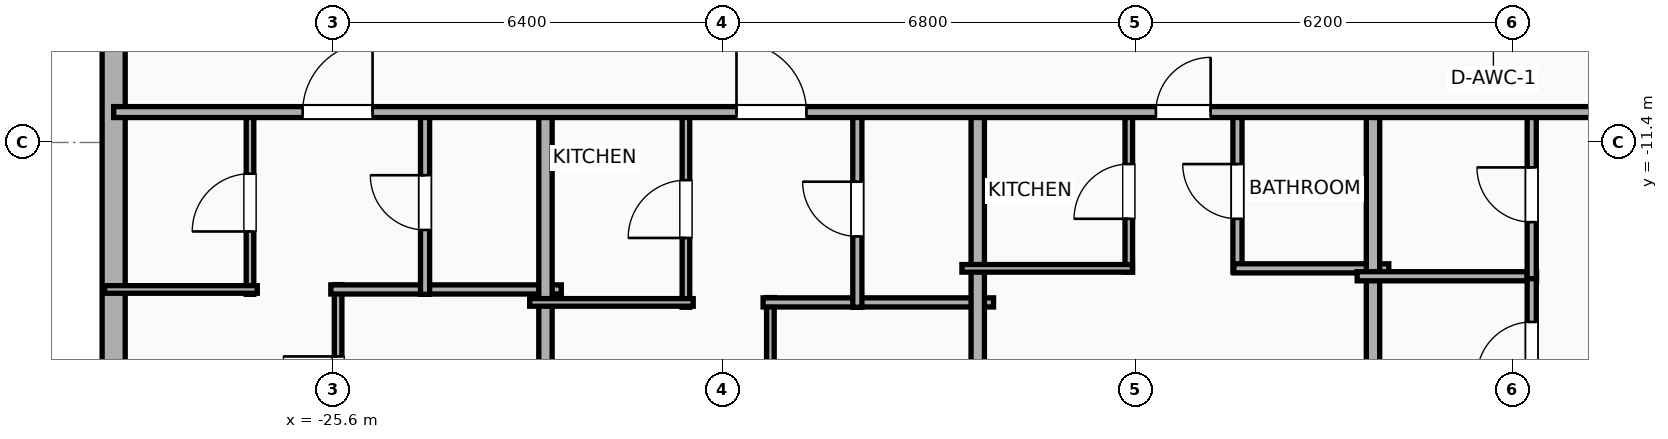
"""IFC4 building model, lengths in metres.
Left out: names, types, materials, properties, quantities, classifications, styles, units other than length and angle.
Written with IfcOpenShell. Run it as: python <this file> out.ifc"""

import sys

from ifc_helpers import new_model, si_unit, direction, frame, frame_2d, origin, place, context, subcontext, project, spatial, rectangle, extrude, element, fill, save


model = new_model("IFC4")
c1 = context("Model", 3, precision=1e-05, world=origin(), true_north=direction((0.0, 1.0)))
c2 = subcontext(c1, "Body", "Model", "MODEL_VIEW")
j1 = project(units=[si_unit("LENGTHUNIT", "METRE"), si_unit("PLANEANGLEUNIT", "RADIAN")], contexts=[c1])
p1 = place(None, origin())
s1 = spatial("IfcSite", under=j1, at=p1, CompositionType="ELEMENT")
p2 = place(p1, origin())
s2 = spatial("IfcBuilding", under=s1, at=p2, CompositionType="ELEMENT")
p3 = place(p2, frame((0.0, 0.0, 89.7)))
s3 = spatial("IfcBuildingStorey", under=s2, at=p3, CompositionType="ELEMENT", Elevation=89.7)
p4 = place(p3, frame((-29.21, -16.581, 0.0), z_axis=(0.0, 0.0, 1.0), x_axis=(0.0, 1.0, 0.0)))
e1 = element("IfcWall", 1, at=p4, inside=s3, PredefinedType="ELEMENTEDWALL", context=c2, shape_type="SweptSolid", body=[
    extrude(rectangle(XDim=34.363, YDim=0.38, at=frame_2d((17.181, 0.0))), origin(), (0.0, 0.0, 1.0), 2.54),
])
p5 = place(p4, frame((31.487, 0.0, 0.75)))
e2 = element("IfcOpeningElement", 2, at=p5, cuts=e1, PredefinedType="OPENING", context=c2, shape_type="SweptSolid", body=[
    extrude(rectangle(XDim=1.2, YDim=1.63, at=frame_2d((0.6, 0.815))), frame((0.0, 0.2, 0.0), z_axis=(0.0, -1.0, 0.0), x_axis=(1.0, 0.0, 0.0)), (0.0, 0.0, 1.0), 0.4),
])
p6 = place(p4, frame((20.726, 0.0, 0.75)))
e3 = element("IfcOpeningElement", 3, at=p6, cuts=e1, PredefinedType="OPENING", context=c2, shape_type="SweptSolid", body=[
    extrude(rectangle(XDim=1.2, YDim=1.63, at=frame_2d((0.6, 0.815))), frame((0.0, 0.2, 0.0), z_axis=(0.0, -1.0, 0.0), x_axis=(1.0, 0.0, 0.0)), (0.0, 0.0, 1.0), 0.4),
])
p7 = place(p4, frame((11.376, 0.0, 0.75)))
e4 = element("IfcOpeningElement", 4, at=p7, cuts=e1, PredefinedType="OPENING", context=c2, shape_type="SweptSolid", body=[
    extrude(rectangle(XDim=1.2, YDim=1.63, at=frame_2d((0.6, 0.815))), frame((0.0, 0.2, 0.0), z_axis=(0.0, -1.0, 0.0), x_axis=(1.0, 0.0, 0.0)), (0.0, 0.0, 1.0), 0.4),
])
p8 = place(p3, frame((-25.519, -20.535, 0.0), z_axis=(0.0, 0.0, 1.0), x_axis=(0.0, 1.0, 0.0)))
e5 = element("IfcWall", 5, at=p8, inside=s3, PredefinedType="PARTITIONING", context=c2, shape_type="SweptSolid", body=[
    extrude(rectangle(XDim=6.798, YDim=0.125, at=frame_2d((3.399, 0.0))), origin(), (0.0, 0.0, 1.0), 3.65),
])
p9 = place(p8, frame((4.717, 0.0, 0.0)))
e6 = element("IfcOpeningElement", 6, at=p9, cuts=e5, PredefinedType="OPENING", context=c2, shape_type="SweptSolid", body=[
    extrude(rectangle(XDim=0.9, YDim=2.05, at=frame_2d((0.45, 1.025))), frame((0.0, 0.073, 0.0), z_axis=(0.0, -1.0, 0.0), x_axis=(1.0, 0.0, 0.0)), (0.0, 0.0, 1.0), 0.145),
])
p10 = place(p3, frame((-25.639, -13.817, 0.0), z_axis=(0.0, 0.0, 1.0), x_axis=(1.0, 0.0, 0.0)))
e7 = element("IfcWall", 7, at=p10, inside=s3, PredefinedType="PLUMBINGWALL", context=c2, shape_type="SweptSolid", body=[
    extrude(rectangle(XDim=3.79, YDim=0.15, at=frame_2d((1.895, 0.0))), origin(), (0.0, 0.0, 1.0), 3.65),
])
p11 = place(p3, frame((-26.968, -13.897, 0.0), z_axis=(0.0, 0.0, 1.0), x_axis=(0.0, 1.0, 0.0)))
e8 = element("IfcWall", 8, at=p11, inside=s3, PredefinedType="PARTITIONING", context=c2, shape_type="SweptSolid", body=[
    extrude(rectangle(XDim=3.017, YDim=0.125, at=frame_2d((1.509, 0.0))), origin(), (0.0, 0.0, 1.0), 3.65),
])
p12 = place(p11, frame((1.033, 0.0, 0.0)))
e9 = element("IfcOpeningElement", 9, at=p12, cuts=e8, PredefinedType="OPENING", context=c2, shape_type="SweptSolid", body=[
    extrude(rectangle(XDim=0.95, YDim=2.05, at=frame_2d((0.475, 1.025))), frame((0.0, 0.073, 0.0), z_axis=(0.0, -1.0, 0.0), x_axis=(1.0, 0.0, 0.0)), (0.0, 0.0, 1.0), 0.145),
])
p13 = place(p3, frame((-29.36, -13.817, 0.0), z_axis=(0.0, 0.0, 1.0), x_axis=(1.0, 0.0, 0.0)))
e10 = element("IfcWall", 10, at=p13, inside=s3, PredefinedType="PARTITIONING", context=c2, shape_type="SweptSolid", body=[
    extrude(rectangle(XDim=2.512, YDim=0.125, at=frame_2d((1.256, 0.0))), origin(), (0.0, 0.0, 1.0), 3.65),
])
p14 = place(p3, frame((-24.089, -13.897, 0.0), z_axis=(0.0, 0.0, 1.0), x_axis=(0.0, 1.0, 0.0)))
e11 = element("IfcWall", 11, at=p14, inside=s3, PredefinedType="PLUMBINGWALL", context=c2, shape_type="SweptSolid", body=[
    extrude(rectangle(XDim=3.017, YDim=0.15, at=frame_2d((1.509, 0.0))), origin(), (0.0, 0.0, 1.0), 3.65),
])
p15 = place(p14, frame((1.059, 0.0, 0.0)))
e12 = element("IfcOpeningElement", 12, at=p15, cuts=e11, PredefinedType="OPENING", context=c2, shape_type="SweptSolid", body=[
    extrude(rectangle(XDim=0.9, YDim=2.05, at=frame_2d((0.45, 1.025))), frame((0.0, 0.085, 0.0), z_axis=(0.0, -1.0, 0.0), x_axis=(1.0, 0.0, 0.0)), (0.0, 0.0, 1.0), 0.17),
])
p16 = place(p3, frame((-22.109, -20.41, 0.0), z_axis=(0.0, 0.0, 1.0), x_axis=(0.0, 1.0, 0.0)))
e13 = element("IfcWall", 13, at=p16, inside=s3, PredefinedType="PARTITIONING", context=c2, shape_type="SweptSolid", body=[
    extrude(rectangle(XDim=9.59, YDim=0.22, at=frame_2d((4.795, 0.0))), origin(), (0.0, 0.0, 1.0), 3.65),
])
p17 = place(p3, frame((-18.41, -20.56, 0.0), z_axis=(0.0, 0.0, 1.0), x_axis=(0.0, 1.0, 0.0)))
e14 = element("IfcWall", 14, at=p17, inside=s3, PredefinedType="PARTITIONING", context=c2, shape_type="SweptSolid", body=[
    extrude(rectangle(XDim=6.61, YDim=0.125, at=frame_2d((3.305, 0.0))), origin(), (0.0, 0.0, 1.0), 3.65),
])
p18 = place(p17, frame((4.573, 0.0, 0.0)))
e15 = element("IfcOpeningElement", 15, at=p18, cuts=e14, PredefinedType="OPENING", context=c2, shape_type="SweptSolid", body=[
    extrude(rectangle(XDim=0.9, YDim=2.05, at=frame_2d((0.45, 1.025))), frame((0.0, 0.073, 0.0), z_axis=(0.0, -1.0, 0.0), x_axis=(1.0, 0.0, 0.0)), (0.0, 0.0, 1.0), 0.145),
])
p19 = place(p3, frame((-18.53, -14.03, 0.0), z_axis=(0.0, 0.0, 1.0), x_axis=(1.0, 0.0, 0.0)))
e16 = element("IfcWall", 16, at=p19, inside=s3, PredefinedType="PLUMBINGWALL", context=c2, shape_type="SweptSolid", body=[
    extrude(rectangle(XDim=3.79, YDim=0.15, at=frame_2d((1.895, 0.0))), origin(), (0.0, 0.0, 1.0), 3.65),
])
p20 = place(p3, frame((-19.799, -14.11, 0.0), z_axis=(0.0, 0.0, 1.0), x_axis=(0.0, 1.0, 0.0)))
e17 = element("IfcWall", 17, at=p20, inside=s3, PredefinedType="PARTITIONING", context=c2, shape_type="SweptSolid", body=[
    extrude(rectangle(XDim=3.23, YDim=0.125, at=frame_2d((1.615, 0.0))), origin(), (0.0, 0.0, 1.0), 3.65),
])
p21 = place(p20, frame((1.14, 0.0, 0.0)))
e18 = element("IfcOpeningElement", 18, at=p21, cuts=e17, PredefinedType="OPENING", context=c2, shape_type="SweptSolid", body=[
    extrude(rectangle(XDim=0.95, YDim=2.05, at=frame_2d((0.475, 1.025))), frame((0.0, 0.073, 0.0), z_axis=(0.0, -1.0, 0.0), x_axis=(1.0, 0.0, 0.0)), (0.0, 0.0, 1.0), 0.145),
])
p22 = place(p3, frame((-22.369, -14.03, 0.0), z_axis=(0.0, 0.0, 1.0), x_axis=(1.0, 0.0, 0.0)))
e19 = element("IfcWall", 19, at=p22, inside=s3, PredefinedType="PARTITIONING", context=c2, shape_type="SweptSolid", body=[
    extrude(rectangle(XDim=2.69, YDim=0.125, at=frame_2d((1.345, 0.0))), origin(), (0.0, 0.0, 1.0), 3.65),
])
p23 = place(p3, frame((-16.98, -14.11, 0.0), z_axis=(0.0, 0.0, 1.0), x_axis=(0.0, 1.0, 0.0)))
e20 = element("IfcWall", 20, at=p23, inside=s3, PredefinedType="PLUMBINGWALL", context=c2, shape_type="SweptSolid", body=[
    extrude(rectangle(XDim=3.23, YDim=0.15, at=frame_2d((1.615, 0.0))), origin(), (0.0, 0.0, 1.0), 3.65),
])
p24 = place(p23, frame((1.165, 0.0, 0.0)))
e21 = element("IfcOpeningElement", 21, at=p24, cuts=e20, PredefinedType="OPENING", context=c2, shape_type="SweptSolid", body=[
    extrude(rectangle(XDim=0.9, YDim=2.05, at=frame_2d((0.45, 1.025))), frame((0.0, 0.085, 0.0), z_axis=(0.0, -1.0, 0.0), x_axis=(1.0, 0.0, 0.0)), (0.0, 0.0, 1.0), 0.17),
])
p25 = place(p3, frame((-15.0, -20.41, 0.0), z_axis=(0.0, 0.0, 1.0), x_axis=(0.0, 1.0, 0.0)))
e22 = element("IfcWall", 22, at=p25, inside=s3, PredefinedType="PARTITIONING", context=c2, shape_type="SweptSolid", body=[
    extrude(rectangle(XDim=9.59, YDim=0.22, at=frame_2d((4.795, 0.0))), origin(), (0.0, 0.0, 1.0), 2.54),
])
p26 = place(p3, frame((-12.516, -13.53, 0.0), z_axis=(0.0, 0.0, 1.0), x_axis=(0.0, 1.0, 0.0)))
e23 = element("IfcWall", 23, at=p26, inside=s3, PredefinedType="PARTITIONING", context=c2, shape_type="SweptSolid", body=[
    extrude(rectangle(XDim=2.65, YDim=0.125, at=frame_2d((1.325, 0.0))), origin(), (0.0, 0.0, 1.0), 3.65),
])
p27 = place(p26, frame((0.875, 0.0, 0.0)))
e24 = element("IfcOpeningElement", 24, at=p27, cuts=e23, PredefinedType="OPENING", context=c2, shape_type="SweptSolid", body=[
    extrude(rectangle(XDim=0.9, YDim=2.05, at=frame_2d((0.45, 1.025))), frame((0.0, 0.073, 0.0), z_axis=(0.0, -1.0, 0.0), x_axis=(1.0, 0.0, 0.0)), (0.0, 0.0, 1.0), 0.145),
])
p28 = place(p3, frame((-10.729, -13.53, 0.0), z_axis=(0.0, 0.0, 1.0), x_axis=(0.0, 1.0, 0.0)))
e25 = element("IfcWall", 25, at=p28, inside=s3, PredefinedType="PLUMBINGWALL", context=c2, shape_type="SweptSolid", body=[
    extrude(rectangle(XDim=2.65, YDim=0.15, at=frame_2d((1.325, 0.0))), origin(), (0.0, 0.0, 1.0), 3.65),
])
p29 = place(p28, frame((0.875, 0.0, 0.0)))
e26 = element("IfcOpeningElement", 26, at=p29, cuts=e25, PredefinedType="OPENING", context=c2, shape_type="SweptSolid", body=[
    extrude(rectangle(XDim=0.9, YDim=2.05, at=frame_2d((0.45, 1.025))), frame((0.0, 0.085, 0.0), z_axis=(0.0, -1.0, 0.0), x_axis=(1.0, 0.0, 0.0)), (0.0, 0.0, 1.0), 0.17),
])
p30 = place(p3, frame((-15.26, -13.47, 0.0), z_axis=(0.0, 0.0, 1.0), x_axis=(1.0, 0.0, 0.0)))
e27 = element("IfcWall", 27, at=p30, inside=s3, PredefinedType="PARTITIONING", context=c2, shape_type="SweptSolid", body=[
    extrude(rectangle(XDim=2.804, YDim=0.125, at=frame_2d((1.402, 0.0))), origin(), (0.0, 0.0, 1.0), 3.65),
])
p31 = place(p3, frame((-10.789, -13.47, 0.0), z_axis=(0.0, 0.0, 1.0), x_axis=(1.0, 0.0, 0.0)))
e28 = element("IfcWall", 28, at=p31, inside=s3, PredefinedType="PLUMBINGWALL", context=c2, shape_type="SweptSolid", body=[
    extrude(rectangle(XDim=2.549, YDim=0.15, at=frame_2d((1.274, 0.0))), origin(), (0.0, 0.0, 1.0), 3.65),
])
p32 = place(p3, frame((-8.5, -20.41, 0.0), z_axis=(0.0, 0.0, 1.0), x_axis=(0.0, 1.0, 0.0)))
e29 = element("IfcWall", 29, at=p32, inside=s3, PredefinedType="PARTITIONING", context=c2, shape_type="SweptSolid", body=[
    extrude(rectangle(XDim=9.59, YDim=0.22, at=frame_2d((4.795, 0.0))), origin(), (0.0, 0.0, 1.0), 3.65),
])
p33 = place(p3, frame((-8.76, -13.6, 0.0), z_axis=(0.0, 0.0, 1.0), x_axis=(1.0, 0.0, 0.0)))
e30 = element("IfcWall", 30, at=p33, inside=s3, PredefinedType="PLUMBINGWALL", context=c2, shape_type="SweptSolid", body=[
    extrude(rectangle(XDim=2.95, YDim=0.15, at=frame_2d((1.475, 0.0))), origin(), (0.0, 0.0, 1.0), 3.65),
])
p34 = place(p3, frame((-5.89, -20.458, 0.0), z_axis=(0.0, 0.0, 1.0), x_axis=(0.0, 1.0, 0.0)))
e31 = element("IfcWall", 31, at=p34, inside=s3, PredefinedType="PLUMBINGWALL", context=c2, shape_type="SweptSolid", body=[
    extrude(rectangle(XDim=6.897, YDim=0.15, at=frame_2d((3.449, 0.0))), origin(), (0.0, 0.0, 1.0), 3.65),
])
p35 = place(p34, frame((5.206, 0.0, 0.0)))
e32 = element("IfcOpeningElement", 32, at=p35, cuts=e31, PredefinedType="OPENING", context=c2, shape_type="SweptSolid", body=[
    extrude(rectangle(XDim=0.9, YDim=2.05, at=frame_2d((0.45, 1.025))), frame((0.0, 0.085, 0.0), z_axis=(0.0, -1.0, 0.0), x_axis=(1.0, 0.0, 0.0)), (0.0, 0.0, 1.0), 0.17),
])
p36 = place(p3, frame((-5.89, -13.64, 0.0), z_axis=(0.0, 0.0, 1.0), x_axis=(0.0, 1.0, 0.0)))
e33 = element("IfcWall", 33, at=p36, inside=s3, PredefinedType="PLUMBINGWALL", context=c2, shape_type="SweptSolid", body=[
    extrude(rectangle(XDim=2.76, YDim=0.15, at=frame_2d((1.38, 0.0))), origin(), (0.0, 0.0, 1.0), 3.65),
])
p37 = place(p36, frame((0.93, 0.0, 0.0)))
e34 = element("IfcOpeningElement", 34, at=p37, cuts=e33, PredefinedType="OPENING", context=c2, shape_type="SweptSolid", body=[
    extrude(rectangle(XDim=0.9, YDim=2.05, at=frame_2d((0.45, 1.025))), frame((0.0, 0.085, 0.0), z_axis=(0.0, -1.0, 0.0), x_axis=(1.0, 0.0, 0.0)), (0.0, 0.0, 1.0), 0.17),
])
p38 = place(p3, frame((-29.21, -10.9, 0.0), z_axis=(0.0, 0.0, 1.0), x_axis=(1.0, 0.0, 0.0)))
e35 = element("IfcWall", 35, at=p38, inside=s3, PredefinedType="PARTITIONING", context=c2, shape_type="SweptSolid", body=[
    extrude(rectangle(XDim=62.42, YDim=0.18, at=frame_2d((31.21, 0.0))), origin(), (0.0, 0.0, 1.0), 3.65),
])
p39 = place(p38, frame((3.108, 0.0, 0.0)))
e36 = element("IfcOpeningElement", 36, at=p39, cuts=e35, PredefinedType="OPENING", context=c2, shape_type="SweptSolid", body=[
    extrude(rectangle(XDim=1.15, YDim=2.05, at=frame_2d((0.575, 1.025))), frame((0.0, 0.1, 0.0), z_axis=(0.0, -1.0, 0.0), x_axis=(1.0, 0.0, 0.0)), (0.0, 0.0, 1.0), 0.2),
])
p40 = place(p38, frame((10.242, 0.0, 0.0)))
e37 = element("IfcOpeningElement", 37, at=p40, cuts=e35, PredefinedType="OPENING", context=c2, shape_type="SweptSolid", body=[
    extrude(rectangle(XDim=1.15, YDim=2.05, at=frame_2d((0.575, 1.025))), frame((0.0, 0.1, 0.0), z_axis=(0.0, -1.0, 0.0), x_axis=(1.0, 0.0, 0.0)), (0.0, 0.0, 1.0), 0.2),
])
p41 = place(p38, frame((17.14, 0.0, 0.0)))
e38 = element("IfcOpeningElement", 38, at=p41, cuts=e35, PredefinedType="OPENING", context=c2, shape_type="SweptSolid", body=[
    extrude(rectangle(XDim=0.9, YDim=2.05, at=frame_2d((0.45, 1.025))), frame((0.0, 0.1, 0.0), z_axis=(0.0, -1.0, 0.0), x_axis=(1.0, 0.0, 0.0)), (0.0, 0.0, 1.0), 0.2),
])
p42 = place(p38, frame((24.661, 0.0, 0.0)))
e39 = element("IfcOpeningElement", 39, at=p42, cuts=e35, PredefinedType="OPENING", context=c2, shape_type="SweptSolid", body=[
    extrude(rectangle(XDim=1.15, YDim=2.05, at=frame_2d((0.575, 1.025))), frame((0.0, 0.1, 0.0), z_axis=(0.0, -1.0, 0.0), x_axis=(1.0, 0.0, 0.0)), (0.0, 0.0, 1.0), 0.2),
])
p43 = place(p38, frame((28.644, 0.0, 0.0)))
e40 = element("IfcOpeningElement", 40, at=p43, cuts=e35, PredefinedType="OPENING", context=c2, shape_type="SweptSolid", body=[
    extrude(rectangle(XDim=1.15, YDim=2.05, at=frame_2d((0.575, 1.025))), frame((0.0, 0.1, 0.0), z_axis=(0.0, -1.0, 0.0), x_axis=(1.0, 0.0, 0.0)), (0.0, 0.0, 1.0), 0.2),
])
p44 = place(p38, frame((36.64, 0.0, 0.0)))
e41 = element("IfcOpeningElement", 41, at=p44, cuts=e35, PredefinedType="OPENING", context=c2, shape_type="SweptSolid", body=[
    extrude(rectangle(XDim=0.9, YDim=2.05, at=frame_2d((0.45, 1.025))), frame((0.0, 0.1, 0.0), z_axis=(0.0, -1.0, 0.0), x_axis=(1.0, 0.0, 0.0)), (0.0, 0.0, 1.0), 0.2),
])
p45 = place(p38, frame((41.44, 0.0, 0.0)))
e42 = element("IfcOpeningElement", 42, at=p45, cuts=e35, PredefinedType="OPENING", context=c2, shape_type="SweptSolid", body=[
    extrude(rectangle(XDim=1.15, YDim=2.05, at=frame_2d((0.575, 1.025))), frame((0.0, 0.1, 0.0), z_axis=(0.0, -1.0, 0.0), x_axis=(1.0, 0.0, 0.0)), (0.0, 0.0, 1.0), 0.2),
])
p46 = place(p38, frame((47.538, 0.0, 0.0)))
e43 = element("IfcOpeningElement", 43, at=p46, cuts=e35, PredefinedType="OPENING", context=c2, shape_type="SweptSolid", body=[
    extrude(rectangle(XDim=1.15, YDim=2.05, at=frame_2d((0.575, 1.025))), frame((0.0, 0.1, 0.0), z_axis=(0.0, -1.0, 0.0), x_axis=(1.0, 0.0, 0.0)), (0.0, 0.0, 1.0), 0.2),
])
p47 = place(p38, frame((57.157, 0.0, 0.0)))
e44 = element("IfcOpeningElement", 44, at=p47, cuts=e35, PredefinedType="OPENING", context=c2, shape_type="SweptSolid", body=[
    extrude(rectangle(XDim=1.15, YDim=2.05, at=frame_2d((0.575, 1.025))), frame((0.0, 0.1, 0.0), z_axis=(0.0, -1.0, 0.0), x_axis=(1.0, 0.0, 0.0)), (0.0, 0.0, 1.0), 0.2),
])
p48 = place(p9, origin())
e45 = element("IfcDoor", 45, at=p48, inside=s3, OperationType="SINGLE_SWING_RIGHT", PredefinedType="DOOR", context=c2, shape_type="SweptSolid", body=[
    extrude(rectangle(XDim=0.9, YDim=2.05, at=frame_2d((0.45, 1.025))), frame((0.0, 0.025, 0.0), z_axis=(0.0, -1.0, 0.0), x_axis=(1.0, 0.0, 0.0)), (0.0, 0.0, 1.0), 0.05),
])
fill(e6, e45)
p49 = place(p12, origin())
e46 = element("IfcDoor", 46, at=p49, inside=s3, OperationType="SINGLE_SWING_LEFT", PredefinedType="DOOR", context=c2, shape_type="SweptSolid", body=[
    extrude(rectangle(XDim=0.95, YDim=2.05, at=frame_2d((0.475, 1.025))), frame((0.0, 0.025, 0.0), z_axis=(0.0, -1.0, 0.0), x_axis=(1.0, 0.0, 0.0)), (0.0, 0.0, 1.0), 0.05),
])
fill(e9, e46)
p50 = place(p15, origin())
e47 = element("IfcDoor", 47, at=p50, inside=s3, OperationType="SINGLE_SWING_RIGHT", PredefinedType="DOOR", context=c2, shape_type="SweptSolid", body=[
    extrude(rectangle(XDim=0.9, YDim=2.05, at=frame_2d((0.45, 1.025))), frame((0.0, 0.025, 0.0), z_axis=(0.0, -1.0, 0.0), x_axis=(1.0, 0.0, 0.0)), (0.0, 0.0, 1.0), 0.05),
])
fill(e12, e47)
p51 = place(p21, origin())
e48 = element("IfcDoor", 48, at=p51, inside=s3, OperationType="SINGLE_SWING_LEFT", PredefinedType="DOOR", context=c2, shape_type="SweptSolid", body=[
    extrude(rectangle(XDim=0.95, YDim=2.05, at=frame_2d((0.475, 1.025))), frame((0.0, 0.025, 0.0), z_axis=(0.0, -1.0, 0.0), x_axis=(1.0, 0.0, 0.0)), (0.0, 0.0, 1.0), 0.05),
])
fill(e18, e48)
p52 = place(p24, origin())
e49 = element("IfcDoor", 49, at=p52, inside=s3, OperationType="SINGLE_SWING_RIGHT", PredefinedType="DOOR", context=c2, shape_type="SweptSolid", body=[
    extrude(rectangle(XDim=0.9, YDim=2.05, at=frame_2d((0.45, 1.025))), frame((0.0, 0.025, 0.0), z_axis=(0.0, -1.0, 0.0), x_axis=(1.0, 0.0, 0.0)), (0.0, 0.0, 1.0), 0.05),
])
fill(e21, e49)
p53 = place(p27, origin())
e50 = element("IfcDoor", 50, at=p53, inside=s3, OperationType="SINGLE_SWING_LEFT", PredefinedType="DOOR", context=c2, shape_type="SweptSolid", body=[
    extrude(rectangle(XDim=0.9, YDim=2.05, at=frame_2d((0.45, 1.025))), frame((0.0, 0.025, 0.0), z_axis=(0.0, -1.0, 0.0), x_axis=(1.0, 0.0, 0.0)), (0.0, 0.0, 1.0), 0.05),
])
fill(e24, e50)
p54 = place(p29, origin())
e51 = element("IfcDoor", 51, at=p54, inside=s3, OperationType="SINGLE_SWING_RIGHT", PredefinedType="DOOR", context=c2, shape_type="SweptSolid", body=[
    extrude(rectangle(XDim=0.9, YDim=2.05, at=frame_2d((0.45, 1.025))), frame((0.0, 0.025, 0.0), z_axis=(0.0, -1.0, 0.0), x_axis=(1.0, 0.0, 0.0)), (0.0, 0.0, 1.0), 0.05),
])
fill(e26, e51)
p55 = place(p35, origin())
e52 = element("IfcDoor", 52, at=p55, inside=s3, OperationType="SINGLE_SWING_LEFT", PredefinedType="DOOR", context=c2, shape_type="SweptSolid", body=[
    extrude(rectangle(XDim=0.9, YDim=2.05, at=frame_2d((0.45, 1.025))), frame((0.0, 0.025, 0.0), z_axis=(0.0, -1.0, 0.0), x_axis=(1.0, 0.0, 0.0)), (0.0, 0.0, 1.0), 0.05),
])
fill(e32, e52)
p56 = place(p37, origin())
e53 = element("IfcDoor", 53, at=p56, inside=s3, OperationType="SINGLE_SWING_RIGHT", PredefinedType="DOOR", context=c2, shape_type="SweptSolid", body=[
    extrude(rectangle(XDim=0.9, YDim=2.05, at=frame_2d((0.45, 1.025))), frame((0.0, 0.025, 0.0), z_axis=(0.0, -1.0, 0.0), x_axis=(1.0, 0.0, 0.0)), (0.0, 0.0, 1.0), 0.05),
])
fill(e34, e53)
p57 = place(p39, origin())
e54 = element("IfcDoor", 54, at=p57, inside=s3, OperationType="SINGLE_SWING_RIGHT", PredefinedType="DOOR", context=c2, shape_type="SweptSolid", body=[
    extrude(rectangle(XDim=1.15, YDim=2.05, at=frame_2d((0.575, 1.025))), frame((0.0, 0.025, 0.0), z_axis=(0.0, -1.0, 0.0), x_axis=(1.0, 0.0, 0.0)), (0.0, 0.0, 1.0), 0.05),
])
fill(e36, e54)
p58 = place(p40, origin())
e55 = element("IfcDoor", 55, at=p58, inside=s3, OperationType="SINGLE_SWING_LEFT", PredefinedType="DOOR", context=c2, shape_type="SweptSolid", body=[
    extrude(rectangle(XDim=1.15, YDim=2.05, at=frame_2d((0.575, 1.025))), frame((0.0, 0.025, 0.0), z_axis=(0.0, -1.0, 0.0), x_axis=(1.0, 0.0, 0.0)), (0.0, 0.0, 1.0), 0.05),
])
fill(e37, e55)
p59 = place(p41, origin())
e56 = element("IfcDoor", 56, at=p59, inside=s3, OperationType="SINGLE_SWING_RIGHT", PredefinedType="DOOR", context=c2, shape_type="SweptSolid", body=[
    extrude(rectangle(XDim=0.9, YDim=2.05, at=frame_2d((0.45, 1.025))), frame((0.0, 0.025, 0.0), z_axis=(0.0, -1.0, 0.0), x_axis=(1.0, 0.0, 0.0)), (0.0, 0.0, 1.0), 0.05),
])
fill(e38, e56)
save(model, sys.argv[1])
